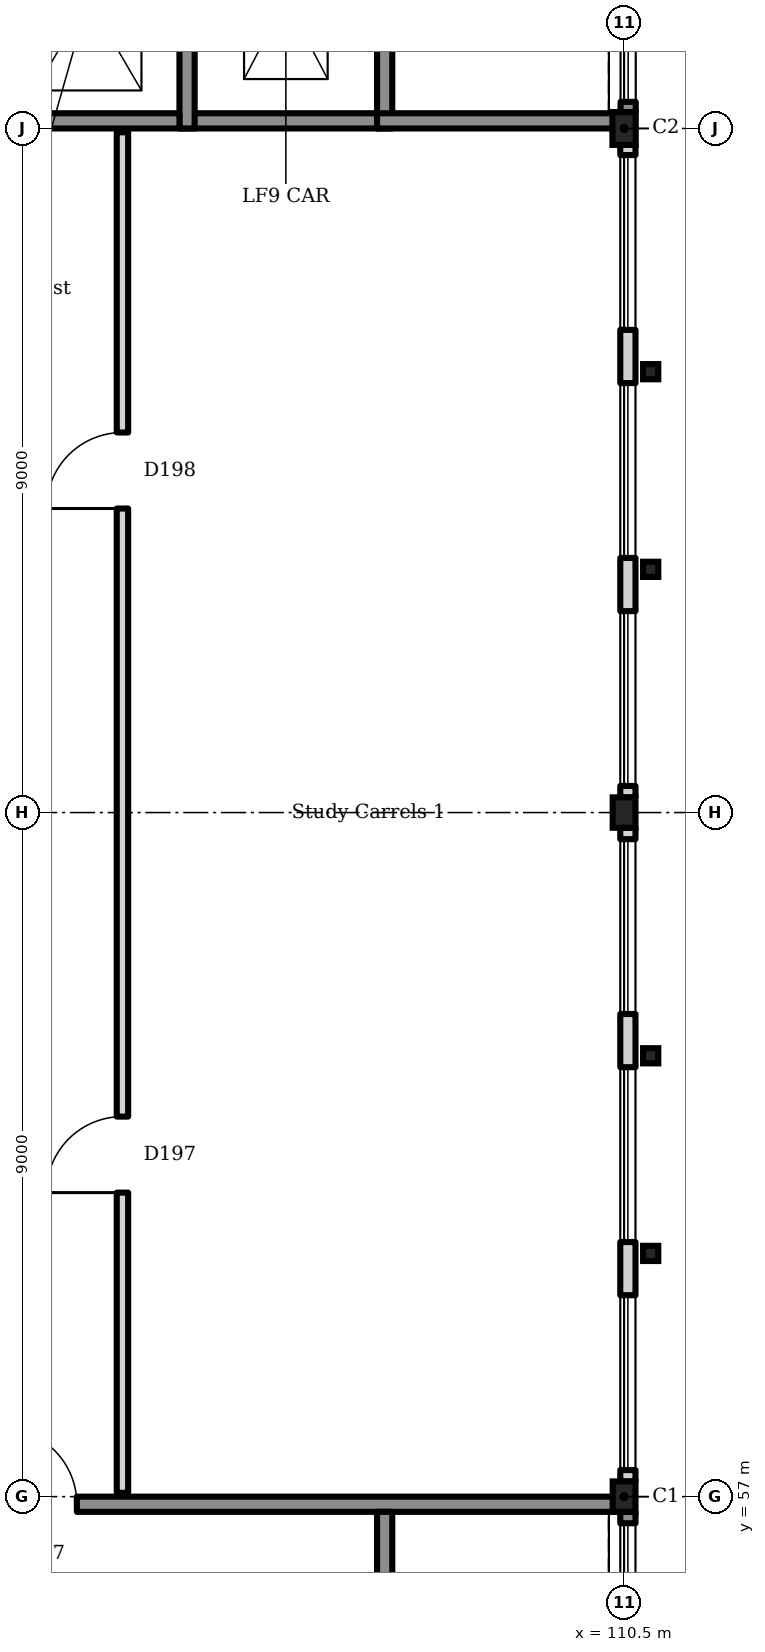
"""IFC4 building model, lengths in metres.
Left out: names, types, materials, properties, quantities, classifications, styles, units other than length and angle.
Written with IfcOpenShell. Run it as: python <this file> out.ifc"""

import sys

from ifc_helpers import new_model, si_unit, direction, frame, frame_2d, origin, origin_2d, place, context, subcontext, project, spatial, rectangle, hollow_rectangle, i_section, extrude, element, fill, save


model = new_model("IFC4")
c1 = context("Model", 3, precision=1e-05, world=origin(), true_north=direction((0.0, 1.0)))
c2 = subcontext(c1, "Body", "Model", "MODEL_VIEW")
j1 = project(units=[si_unit("LENGTHUNIT", "METRE"), si_unit("PLANEANGLEUNIT", "RADIAN")], contexts=[c1])
p1 = place(None, origin())
s1 = spatial("IfcSite", under=j1, at=p1, CompositionType="ELEMENT")
p2 = place(p1, origin())
s2 = spatial("IfcBuilding", under=s1, at=p2, CompositionType="ELEMENT")
p3 = place(p2, frame((0.0, 0.0, 5.4)))
s3 = spatial("IfcBuildingStorey", under=s2, at=p3, CompositionType="ELEMENT", Elevation=5.4)
p4 = place(p3, frame((104.65, 75.1, 0.0), z_axis=(0.0, 0.0, 1.0), x_axis=(1.0, 0.0, 0.0)))
e1 = element("IfcWall", 1, at=p4, inside=s3, PredefinedType="SOLIDWALL", context=c2, shape_type="SweptSolid", body=[
    extrude(rectangle(XDim=2.6, YDim=0.2, at=frame_2d((1.3, 0.0))), origin(), (0.0, 0.0, 1.0), 4.5),
])
for number, where, z_axis, x_axis in (
    (2, (104.75, 75.0, 0.0), (0.0, 0.0, 1.0), (0.0, 1.0, 0.0)),
    (3, (107.35, 75.0, 0.0), (0.0, 0.0, 1.0), (0.0, 1.0, 0.0)),
):
    element("IfcWall", number, at=place(p3, frame(where, z_axis=z_axis, x_axis=x_axis)), inside=s3, PredefinedType="SOLIDWALL", context=c2, shape_type="SweptSolid", body=[
        extrude(rectangle(XDim=3.4, YDim=0.2, at=frame_2d((1.7, 0.0))), origin(), (0.0, 0.0, 1.0), 4.5),
    ])
p5 = place(p3, frame((102.05, 75.1, 0.0), z_axis=(0.0, 0.0, 1.0), x_axis=(1.0, 0.0, 0.0)))
e4 = element("IfcWall", 4, at=p5, inside=s3, PredefinedType="SOLIDWALL", context=c2, shape_type="SweptSolid", body=[
    extrude(rectangle(XDim=2.6, YDim=0.2, at=frame_2d((1.3, 0.0))), origin(), (0.0, 0.0, 1.0), 4.5),
])
for number, where, z_axis, x_axis in (
    (5, (110.5, 57.0, 0.0), (0.0, 0.0, 1.0), (1.0, 0.0, 0.0)),
    (6, (110.5, 66.0, 0.0), (0.0, 0.0, 1.0), (1.0, 0.0, 0.0)),
):
    element("IfcColumn", number, at=place(p3, frame(where, z_axis=z_axis, x_axis=x_axis)), inside=s3, PredefinedType="COLUMN", context=c2, shape_type="SweptSolid", body=[
        extrude(i_section(OverallWidth=0.3, OverallDepth=0.4, WebThickness=0.013, FlangeThickness=0.024, FilletRadius=0.027, at=origin_2d()), origin(), (0.0, 0.0, 1.0), 4.5),
    ])
p6 = place(p3, frame((110.5, 75.0, 0.0), z_axis=(0.0, 0.0, 1.0), x_axis=(1.0, 0.0, 0.0)))
e7 = element("IfcColumn", 7, at=p6, inside=s3, PredefinedType="COLUMN", context=c2, shape_type="SweptSolid", body=[
    extrude(i_section(OverallWidth=0.307, OverallDepth=0.432, WebThickness=0.021, FlangeThickness=0.04, FilletRadius=0.027, at=origin_2d()), origin(), (0.0, 0.0, 1.0), 4.5),
])
p7 = place(p3, frame((110.55, 48.32, 0.0), z_axis=(0.0, 0.0, 1.0), x_axis=(0.0, 1.0, 0.0)))
e8 = element("IfcWall", 8, at=p7, inside=s3, PredefinedType="SOLIDWALL", context=c2, shape_type="SweptSolid", body=[
    extrude(rectangle(XDim=8.48, YDim=0.2, at=frame_2d((4.24, 0.0))), origin(), (0.0, 0.0, 1.0), 4.25),
])
p8 = place(p7, frame((3.03, 0.0, 0.9)))
e9 = element("IfcOpeningElement", 9, at=p8, cuts=e8, PredefinedType="OPENING", context=c2, shape_type="SweptSolid", body=[
    extrude(rectangle(XDim=2.3, YDim=2.7, at=frame_2d((1.15, 1.35))), frame((0.0, 0.11, 0.0), z_axis=(0.0, -1.0, 0.0), x_axis=(1.0, 0.0, 0.0)), (0.0, 0.0, 1.0), 0.22),
])
p9 = place(p7, frame((6.03, 0.0, 0.9)))
e10 = element("IfcOpeningElement", 10, at=p9, cuts=e8, PredefinedType="OPENING", context=c2, shape_type="SweptSolid", body=[
    extrude(rectangle(XDim=2.3, YDim=2.7, at=frame_2d((1.15, 1.35))), frame((0.0, 0.11, 0.0), z_axis=(0.0, -1.0, 0.0), x_axis=(1.0, 0.0, 0.0)), (0.0, 0.0, 1.0), 0.22),
])
p10 = place(p3, frame((110.55, 57.2, 0.0), z_axis=(0.0, 0.0, 1.0), x_axis=(0.0, 1.0, 0.0)))
e11 = element("IfcWall", 11, at=p10, inside=s3, PredefinedType="SOLIDWALL", context=c2, shape_type="SweptSolid", body=[
    extrude(rectangle(XDim=8.6, YDim=0.2, at=frame_2d((4.3, 0.0))), origin(), (0.0, 0.0, 1.0), 3.75),
])
p11 = place(p10, frame((0.15, 0.0, 0.9)))
e12 = element("IfcOpeningElement", 12, at=p11, cuts=e11, PredefinedType="OPENING", context=c2, shape_type="SweptSolid", body=[
    extrude(rectangle(XDim=2.3, YDim=2.7, at=frame_2d((1.15, 1.35))), frame((0.0, 0.11, 0.0), z_axis=(0.0, -1.0, 0.0), x_axis=(1.0, 0.0, 0.0)), (0.0, 0.0, 1.0), 0.22),
])
p12 = place(p10, frame((3.15, 0.0, 0.9)))
e13 = element("IfcOpeningElement", 13, at=p12, cuts=e11, PredefinedType="OPENING", context=c2, shape_type="SweptSolid", body=[
    extrude(rectangle(XDim=2.3, YDim=2.7, at=frame_2d((1.15, 1.35))), frame((0.0, 0.11, 0.0), z_axis=(0.0, -1.0, 0.0), x_axis=(1.0, 0.0, 0.0)), (0.0, 0.0, 1.0), 0.22),
])
p13 = place(p10, frame((6.15, 0.0, 0.9)))
e14 = element("IfcOpeningElement", 14, at=p13, cuts=e11, PredefinedType="OPENING", context=c2, shape_type="SweptSolid", body=[
    extrude(rectangle(XDim=2.3, YDim=2.7, at=frame_2d((1.15, 1.35))), frame((0.0, 0.11, 0.0), z_axis=(0.0, -1.0, 0.0), x_axis=(1.0, 0.0, 0.0)), (0.0, 0.0, 1.0), 0.22),
])
p14 = place(p3, frame((110.55, 66.2, 0.0), z_axis=(0.0, 0.0, 1.0), x_axis=(0.0, 1.0, 0.0)))
e15 = element("IfcWall", 15, at=p14, inside=s3, PredefinedType="SOLIDWALL", context=c2, shape_type="SweptSolid", body=[
    extrude(rectangle(XDim=8.584, YDim=0.2, at=frame_2d((4.292, 0.0))), origin(), (0.0, 0.0, 1.0), 3.75),
])
p15 = place(p14, frame((0.15, 0.0, 0.9)))
e16 = element("IfcOpeningElement", 16, at=p15, cuts=e15, PredefinedType="OPENING", context=c2, shape_type="SweptSolid", body=[
    extrude(rectangle(XDim=2.3, YDim=2.7, at=frame_2d((1.15, 1.35))), frame((0.0, 0.11, 0.0), z_axis=(0.0, -1.0, 0.0), x_axis=(1.0, 0.0, 0.0)), (0.0, 0.0, 1.0), 0.22),
])
p16 = place(p14, frame((3.15, 0.0, 0.9)))
e17 = element("IfcOpeningElement", 17, at=p16, cuts=e15, PredefinedType="OPENING", context=c2, shape_type="SweptSolid", body=[
    extrude(rectangle(XDim=2.3, YDim=2.7, at=frame_2d((1.15, 1.35))), frame((0.0, 0.11, 0.0), z_axis=(0.0, -1.0, 0.0), x_axis=(1.0, 0.0, 0.0)), (0.0, 0.0, 1.0), 0.22),
])
p17 = place(p14, frame((6.15, 0.0, 0.9)))
e18 = element("IfcOpeningElement", 18, at=p17, cuts=e15, PredefinedType="OPENING", context=c2, shape_type="SweptSolid", body=[
    extrude(rectangle(XDim=2.3, YDim=2.7, at=frame_2d((1.15, 1.35))), frame((0.0, 0.11, 0.0), z_axis=(0.0, -1.0, 0.0), x_axis=(1.0, 0.0, 0.0)), (0.0, 0.0, 1.0), 0.22),
])
p18 = place(p3, frame((110.553, 75.216, 0.0), z_axis=(0.0, 0.0, 1.0), x_axis=(0.0, 1.0, 0.0)))
e19 = element("IfcWall", 19, at=p18, inside=s3, PredefinedType="SOLIDWALL", context=c2, shape_type="SweptSolid", body=[
    extrude(rectangle(XDim=8.418, YDim=0.2, at=frame_2d((4.209, 0.0))), origin(), (0.0, 0.0, 1.0), 4.3),
])
p19 = place(p18, frame((0.134, 0.0, 0.9)))
e20 = element("IfcOpeningElement", 20, at=p19, cuts=e19, PredefinedType="OPENING", context=c2, shape_type="SweptSolid", body=[
    extrude(rectangle(XDim=2.3, YDim=2.7, at=frame_2d((1.15, 1.35))), frame((0.0, 0.11, 0.0), z_axis=(0.0, -1.0, 0.0), x_axis=(1.0, 0.0, 0.0)), (0.0, 0.0, 1.0), 0.22),
])
p20 = place(p18, frame((3.134, 0.0, 0.9)))
e21 = element("IfcOpeningElement", 21, at=p20, cuts=e19, PredefinedType="OPENING", context=c2, shape_type="SweptSolid", body=[
    extrude(rectangle(XDim=2.3, YDim=2.7, at=frame_2d((1.15, 1.35))), frame((0.0, 0.11, 0.0), z_axis=(0.0, -1.0, 0.0), x_axis=(1.0, 0.0, 0.0)), (0.0, 0.0, 1.0), 0.22),
])
p21 = place(p3, frame((107.25, 75.1, 0.0), z_axis=(0.0, 0.0, 1.0), x_axis=(1.0, 0.0, 0.0)))
e22 = element("IfcWall", 22, at=p21, inside=s3, PredefinedType="SHEAR", context=c2, shape_type="SweptSolid", body=[
    extrude(rectangle(XDim=3.25, YDim=0.2, at=frame_2d((1.625, 0.0))), origin(), (0.0, 0.0, 1.0), 4.3),
])
p22 = place(p3, frame((101.5, 56.9, 0.0), z_axis=(0.0, 0.0, 1.0), x_axis=(1.0, 0.0, 0.0)))
e23 = element("IfcWall", 23, at=p22, inside=s3, PredefinedType="SHEAR", context=c2, shape_type="SweptSolid", body=[
    extrude(rectangle(XDim=9.0, YDim=0.2, at=frame_2d((4.5, 0.0))), origin(), (0.0, 0.0, 1.0), 4.25),
])
p23 = place(p22, frame((0.8, 0.0, 0.0)))
e24 = element("IfcOpeningElement", 24, at=p23, cuts=e23, PredefinedType="OPENING", context=c2, shape_type="SweptSolid", body=[
    extrude(rectangle(XDim=1.0, YDim=2.1, at=frame_2d((0.5, 1.05))), frame((0.0, 0.11, 0.0), z_axis=(0.0, -1.0, 0.0), x_axis=(1.0, 0.0, 0.0)), (0.0, 0.0, 1.0), 0.22),
])
p24 = place(p3, frame((107.35, 48.15, 0.0), z_axis=(0.0, 0.0, 1.0), x_axis=(0.0, 1.0, 0.0)))
e25 = element("IfcWall", 25, at=p24, inside=s3, PredefinedType="SHEAR", context=c2, shape_type="SweptSolid", body=[
    extrude(rectangle(XDim=8.65, YDim=0.2, at=frame_2d((4.325, 0.0))), origin(), (0.0, 0.0, 1.0), 4.25),
])
p25 = place(p24, frame((0.35, 0.0, 0.0)))
e26 = element("IfcOpeningElement", 26, at=p25, cuts=e25, PredefinedType="OPENING", context=c2, shape_type="SweptSolid", body=[
    extrude(rectangle(XDim=1.0, YDim=2.1, at=frame_2d((0.5, 1.05))), frame((0.0, 0.11, 0.0), z_axis=(0.0, -1.0, 0.0), x_axis=(1.0, 0.0, 0.0)), (0.0, 0.0, 1.0), 0.22),
])
p26 = place(p3, frame((103.9, 57.05, 0.0), z_axis=(0.0, 0.0, 1.0), x_axis=(0.0, 1.0, 0.0)))
e27 = element("IfcWall", 27, at=p26, inside=s3, PredefinedType="PARTITIONING", context=c2, shape_type="SweptSolid", body=[
    extrude(rectangle(XDim=17.9, YDim=0.15, at=frame_2d((8.95, 0.0))), origin(), (0.0, 0.0, 1.0), 3.7),
])
p27 = place(p26, frame((3.95, 0.0, 0.0)))
e28 = element("IfcOpeningElement", 28, at=p27, cuts=e27, PredefinedType="OPENING", context=c2, shape_type="SweptSolid", body=[
    extrude(rectangle(XDim=1.0, YDim=2.1, at=frame_2d((0.5, 1.05))), frame((0.0, 0.085, 0.0), z_axis=(0.0, -1.0, 0.0), x_axis=(1.0, 0.0, 0.0)), (0.0, 0.0, 1.0), 0.17),
])
p28 = place(p26, frame((12.95, 0.0, 0.0)))
e29 = element("IfcOpeningElement", 29, at=p28, cuts=e27, PredefinedType="OPENING", context=c2, shape_type="SweptSolid", body=[
    extrude(rectangle(XDim=1.0, YDim=2.1, at=frame_2d((0.5, 1.05))), frame((0.0, 0.085, 0.0), z_axis=(0.0, -1.0, 0.0), x_axis=(1.0, 0.0, 0.0)), (0.0, 0.0, 1.0), 0.17),
])
for number, where, z_axis, x_axis in (
    (30, (110.85, 60.2, 0.0), (0.0, 0.0, 1.0), (1.0, 0.0, 0.0)),
    (31, (110.85, 62.8, 0.0), (0.0, 0.0, 1.0), (1.0, 0.0, 0.0)),
    (32, (110.85, 69.2, 0.0), (0.0, 0.0, 1.0), (1.0, 0.0, 0.0)),
    (33, (110.85, 71.8, 0.0), (0.0, 0.0, 1.0), (1.0, 0.0, 0.0)),
):
    element("IfcColumn", number, at=place(p3, frame(where, z_axis=z_axis, x_axis=x_axis)), inside=s3, PredefinedType="COLUMN", context=c2, shape_type="SweptSolid", body=[
        extrude(hollow_rectangle(XDim=0.2, YDim=0.2, WallThickness=0.01, InnerFilletRadius=0.01, OuterFilletRadius=0.015, at=origin_2d()), origin(), (0.0, 0.0, 1.0), 4.5),
    ])
p29 = place(p9, origin())
e34 = element("IfcWindow", 34, at=p29, inside=s3, PartitioningType="SINGLE_PANEL", PredefinedType="WINDOW", context=c2, shape_type="SweptSolid", body=[
    extrude(rectangle(XDim=2.3, YDim=2.7, at=frame_2d((1.15, 1.35))), frame((0.0, 0.03, 0.0), z_axis=(0.0, -1.0, 0.0), x_axis=(1.0, 0.0, 0.0)), (0.0, 0.0, 1.0), 0.06),
])
fill(e10, e34)
p30 = place(p11, origin())
e35 = element("IfcWindow", 35, at=p30, inside=s3, PartitioningType="SINGLE_PANEL", PredefinedType="WINDOW", context=c2, shape_type="SweptSolid", body=[
    extrude(rectangle(XDim=2.3, YDim=2.7, at=frame_2d((1.15, 1.35))), frame((0.0, 0.03, 0.0), z_axis=(0.0, -1.0, 0.0), x_axis=(1.0, 0.0, 0.0)), (0.0, 0.0, 1.0), 0.06),
])
fill(e12, e35)
p31 = place(p12, origin())
e36 = element("IfcWindow", 36, at=p31, inside=s3, PartitioningType="SINGLE_PANEL", PredefinedType="WINDOW", context=c2, shape_type="SweptSolid", body=[
    extrude(rectangle(XDim=2.3, YDim=2.7, at=frame_2d((1.15, 1.35))), frame((0.0, 0.03, 0.0), z_axis=(0.0, -1.0, 0.0), x_axis=(1.0, 0.0, 0.0)), (0.0, 0.0, 1.0), 0.06),
])
fill(e13, e36)
p32 = place(p13, origin())
e37 = element("IfcWindow", 37, at=p32, inside=s3, PartitioningType="SINGLE_PANEL", PredefinedType="WINDOW", context=c2, shape_type="SweptSolid", body=[
    extrude(rectangle(XDim=2.3, YDim=2.7, at=frame_2d((1.15, 1.35))), frame((0.0, 0.03, 0.0), z_axis=(0.0, -1.0, 0.0), x_axis=(1.0, 0.0, 0.0)), (0.0, 0.0, 1.0), 0.06),
])
fill(e14, e37)
p33 = place(p15, origin())
e38 = element("IfcWindow", 38, at=p33, inside=s3, PartitioningType="SINGLE_PANEL", PredefinedType="WINDOW", context=c2, shape_type="SweptSolid", body=[
    extrude(rectangle(XDim=2.3, YDim=2.7, at=frame_2d((1.15, 1.35))), frame((0.0, 0.03, 0.0), z_axis=(0.0, -1.0, 0.0), x_axis=(1.0, 0.0, 0.0)), (0.0, 0.0, 1.0), 0.06),
])
fill(e16, e38)
p34 = place(p16, origin())
e39 = element("IfcWindow", 39, at=p34, inside=s3, PartitioningType="SINGLE_PANEL", PredefinedType="WINDOW", context=c2, shape_type="SweptSolid", body=[
    extrude(rectangle(XDim=2.3, YDim=2.7, at=frame_2d((1.15, 1.35))), frame((0.0, 0.03, 0.0), z_axis=(0.0, -1.0, 0.0), x_axis=(1.0, 0.0, 0.0)), (0.0, 0.0, 1.0), 0.06),
])
fill(e17, e39)
p35 = place(p17, origin())
e40 = element("IfcWindow", 40, at=p35, inside=s3, PartitioningType="SINGLE_PANEL", PredefinedType="WINDOW", context=c2, shape_type="SweptSolid", body=[
    extrude(rectangle(XDim=2.3, YDim=2.7, at=frame_2d((1.15, 1.35))), frame((0.0, 0.03, 0.0), z_axis=(0.0, -1.0, 0.0), x_axis=(1.0, 0.0, 0.0)), (0.0, 0.0, 1.0), 0.06),
])
fill(e18, e40)
p36 = place(p19, origin())
e41 = element("IfcWindow", 41, at=p36, inside=s3, PartitioningType="SINGLE_PANEL", PredefinedType="WINDOW", context=c2, shape_type="SweptSolid", body=[
    extrude(rectangle(XDim=2.3, YDim=2.7, at=frame_2d((1.15, 1.35))), frame((0.0, 0.03, 0.0), z_axis=(0.0, -1.0, 0.0), x_axis=(1.0, 0.0, 0.0)), (0.0, 0.0, 1.0), 0.06),
])
fill(e20, e41)
p37 = place(p23, origin())
e42 = element("IfcDoor", 42, at=p37, inside=s3, OperationType="SINGLE_SWING_RIGHT", PredefinedType="DOOR", context=c2, shape_type="SweptSolid", body=[
    extrude(rectangle(XDim=1.0, YDim=2.1, at=frame_2d((0.5, 1.05))), frame((0.0, 0.025, 0.0), z_axis=(0.0, -1.0, 0.0), x_axis=(1.0, 0.0, 0.0)), (0.0, 0.0, 1.0), 0.05),
])
fill(e24, e42)
p38 = place(p27, origin())
e43 = element("IfcDoor", 43, at=p38, inside=s3, OperationType="SINGLE_SWING_RIGHT", PredefinedType="DOOR", context=c2, shape_type="SweptSolid", body=[
    extrude(rectangle(XDim=1.0, YDim=2.1, at=frame_2d((0.5, 1.05))), frame((0.0, 0.025, 0.0), z_axis=(0.0, -1.0, 0.0), x_axis=(1.0, 0.0, 0.0)), (0.0, 0.0, 1.0), 0.05),
])
fill(e28, e43)
p39 = place(p28, origin())
e44 = element("IfcDoor", 44, at=p39, inside=s3, OperationType="SINGLE_SWING_RIGHT", PredefinedType="DOOR", context=c2, shape_type="SweptSolid", body=[
    extrude(rectangle(XDim=1.0, YDim=2.1, at=frame_2d((0.5, 1.05))), frame((0.0, 0.025, 0.0), z_axis=(0.0, -1.0, 0.0), x_axis=(1.0, 0.0, 0.0)), (0.0, 0.0, 1.0), 0.05),
])
fill(e29, e44)
save(model, sys.argv[1])
